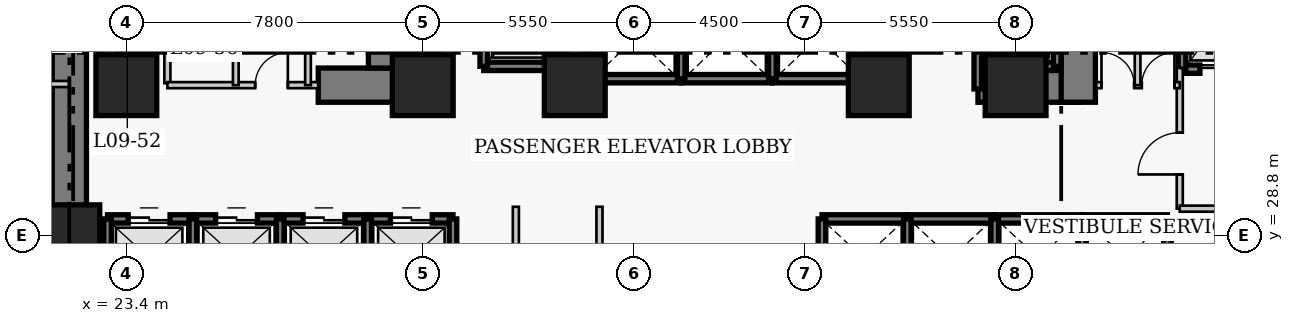
"""IFC4 building model, lengths in metres.
Left out: names, types, materials, properties, quantities, classifications, styles, units other than length and angle.
Written with IfcOpenShell. Run it as: python <this file> out.ifc"""

import sys

from ifc_helpers import new_model, si_unit, direction, frame, frame_2d, origin, origin_2d, place, context, subcontext, project, spatial, rectangle, extrude, element, fill, save


model = new_model("IFC4")
c1 = context("Model", 3, precision=1e-05, world=origin(), true_north=direction((0.0, 1.0)))
c2 = subcontext(c1, "Body", "Model", "MODEL_VIEW")
j1 = project(units=[si_unit("LENGTHUNIT", "METRE"), si_unit("PLANEANGLEUNIT", "RADIAN")], contexts=[c1])
p1 = place(None, origin())
s1 = spatial("IfcSite", under=j1, at=p1, CompositionType="ELEMENT")
p2 = place(p1, origin())
s2 = spatial("IfcBuilding", under=s1, at=p2, CompositionType="ELEMENT")
p3 = place(p2, frame((0.0, 0.0, 41.2)))
s3 = spatial("IfcBuildingStorey", under=s2, at=p3, CompositionType="ELEMENT", Elevation=41.2)
p4 = place(p3, frame((21.9, 27.05, 0.0), z_axis=(0.0, 0.0, 1.0), x_axis=(0.0, 1.0, 0.0)))
e1 = element("IfcWall", 1, at=p4, inside=s3, PredefinedType="SHEAR", context=c2, shape_type="SweptSolid", body=[
    extrude(rectangle(XDim=13.72, YDim=0.9, at=frame_2d((6.86, 0.0))), origin(), (0.0, 0.0, 1.0), 3.8),
])
p5 = place(p3, frame((28.45, 32.75, 0.0), z_axis=(0.0, 0.0, 1.0), x_axis=(1.0, 0.0, 0.0)))
e2 = element("IfcWall", 2, at=p5, inside=s3, PredefinedType="SHEAR", context=c2, shape_type="SweptSolid", body=[
    extrude(rectangle(XDim=2.4, YDim=0.9, at=frame_2d((1.2, 0.0))), origin(), (0.0, 0.0, 1.0), 3.8),
])
p6 = place(p3, frame((45.81, 32.75, 0.0), z_axis=(0.0, 0.0, 1.0), x_axis=(1.0, 0.0, 0.0)))
e3 = element("IfcWall", 3, at=p6, inside=s3, PredefinedType="SHEAR", context=c2, shape_type="SweptSolid", body=[
    extrude(rectangle(XDim=2.64, YDim=0.9, at=frame_2d((1.32, 0.0))), origin(), (0.0, 0.0, 1.0), 3.8),
])
p7 = place(p3, frame((30.22, 33.2, 0.0), z_axis=(0.0, 0.0, 1.0), x_axis=(0.0, 1.0, 0.0)))
e4 = element("IfcWall", 4, at=p7, inside=s3, PredefinedType="SHEAR", context=c2, shape_type="SweptSolid", body=[
    extrude(rectangle(XDim=7.12, YDim=0.9, at=frame_2d((3.56, 0.0))), origin(), (0.0, 0.0, 1.0), 3.8),
])
p8 = place(p3, frame((48.45, 32.3, 0.0), z_axis=(0.0, 0.0, 1.0), x_axis=(0.0, 1.0, 0.0)))
e5 = element("IfcWall", 5, at=p8, inside=s3, PredefinedType="SHEAR", context=c2, shape_type="SweptSolid", body=[
    extrude(rectangle(XDim=8.02, YDim=0.9, at=frame_2d((4.01, 0.0))), origin(), (0.0, 0.0, 1.0), 3.8),
])
p9 = place(p8, frame((5.9, 0.0, 0.0)))
e6 = element("IfcOpeningElement", 6, at=p9, cuts=e5, PredefinedType="OPENING", context=c2, shape_type="SweptSolid", body=[
    extrude(rectangle(XDim=1.1, YDim=2.15, at=frame_2d((0.55, 1.075))), frame((0.0, 0.46, 0.0), z_axis=(0.0, -1.0, 0.0), x_axis=(1.0, 0.0, 0.0)), (0.0, 0.0, 1.0), 0.92),
])
for number, where, z_axis, x_axis in (
    (7, (21.9, 28.8, 0.0), (0.0, 0.0, 1.0), (1.0, 0.0, 0.0)),
    (8, (23.4, 32.75, 0.0), (0.0, 0.0, 1.0), (1.0, 0.0, 0.0)),
    (9, (31.2, 32.75, 0.0), (0.0, 0.0, 1.0), (1.0, 0.0, 0.0)),
    (10, (35.2, 32.75, 0.0), (0.0, 0.0, 1.0), (1.0, 0.0, 0.0)),
    (11, (43.2, 32.75, 0.0), (0.0, 0.0, 1.0), (1.0, 0.0, 0.0)),
    (12, (46.8, 32.75, 0.0), (0.0, 0.0, 1.0), (1.0, 0.0, 0.0)),
):
    element("IfcColumn", number, at=place(p3, frame(where, z_axis=z_axis, x_axis=x_axis)), inside=s3, PredefinedType="COLUMN", context=c2, shape_type="SweptSolid", body=[
        extrude(rectangle(XDim=1.6, YDim=1.6, at=origin_2d()), origin(), (0.0, 0.0, 1.0), 3.8),
    ])
p10 = place(p3, frame((22.905, 29.23, 0.0), z_axis=(0.0, 0.0, 1.0), x_axis=(1.0, 0.0, 0.0)))
e13 = element("IfcWall", 13, at=p10, inside=s3, PredefinedType="SHEAR", context=c2, shape_type="SweptSolid", body=[
    extrude(rectangle(XDim=2.245, YDim=0.22, at=frame_2d((1.123, 0.0))), origin(), (0.0, 0.0, 1.0), 3.8),
])
p11 = place(p10, frame((0.545, 0.0, 0.0)))
e14 = element("IfcOpeningElement", 14, at=p11, cuts=e13, PredefinedType="OPENING", context=c2, shape_type="SweptSolid", body=[
    extrude(rectangle(XDim=1.1, YDim=2.15, at=frame_2d((0.55, 1.075))), frame((0.0, 0.12, 0.0), z_axis=(0.0, -1.0, 0.0), x_axis=(1.0, 0.0, 0.0)), (0.0, 0.0, 1.0), 0.24),
])
p12 = place(p3, frame((22.905, 27.17, 0.0), z_axis=(0.0, 0.0, 1.0), x_axis=(0.0, 1.0, 0.0)))
e15 = element("IfcWall", 15, at=p12, inside=s3, PredefinedType="SHEAR", context=c2, shape_type="SweptSolid", body=[
    extrude(rectangle(XDim=2.06, YDim=0.2, at=frame_2d((1.03, 0.0))), origin(), (0.0, 0.0, 1.0), 3.8),
])
p13 = place(p3, frame((25.15, 29.23, 0.0), z_axis=(0.0, 0.0, 1.0), x_axis=(1.0, 0.0, 0.0)))
e16 = element("IfcWall", 16, at=p13, inside=s3, PredefinedType="SHEAR", context=c2, shape_type="SweptSolid", body=[
    extrude(rectangle(XDim=2.3, YDim=0.22, at=frame_2d((1.15, 0.0))), origin(), (0.0, 0.0, 1.0), 3.8),
])
p14 = place(p13, frame((0.6, 0.0, 0.0)))
e17 = element("IfcOpeningElement", 17, at=p14, cuts=e16, PredefinedType="OPENING", context=c2, shape_type="SweptSolid", body=[
    extrude(rectangle(XDim=1.1, YDim=2.15, at=frame_2d((0.55, 1.075))), frame((0.0, 0.12, 0.0), z_axis=(0.0, -1.0, 0.0), x_axis=(1.0, 0.0, 0.0)), (0.0, 0.0, 1.0), 0.24),
])
p15 = place(p3, frame((25.15, 27.17, 0.0), z_axis=(0.0, 0.0, 1.0), x_axis=(0.0, 1.0, 0.0)))
e18 = element("IfcWall", 18, at=p15, inside=s3, PredefinedType="SHEAR", context=c2, shape_type="SweptSolid", body=[
    extrude(rectangle(XDim=2.06, YDim=0.2, at=frame_2d((1.03, 0.0))), origin(), (0.0, 0.0, 1.0), 3.8),
])
p16 = place(p3, frame((27.45, 29.23, 0.0), z_axis=(0.0, 0.0, 1.0), x_axis=(1.0, 0.0, 0.0)))
e19 = element("IfcWall", 19, at=p16, inside=s3, PredefinedType="SHEAR", context=c2, shape_type="SweptSolid", body=[
    extrude(rectangle(XDim=2.3, YDim=0.22, at=frame_2d((1.15, 0.0))), origin(), (0.0, 0.0, 1.0), 3.8),
])
p17 = place(p16, frame((0.6, 0.0, 0.0)))
e20 = element("IfcOpeningElement", 20, at=p17, cuts=e19, PredefinedType="OPENING", context=c2, shape_type="SweptSolid", body=[
    extrude(rectangle(XDim=1.1, YDim=2.15, at=frame_2d((0.55, 1.075))), frame((0.0, 0.12, 0.0), z_axis=(0.0, -1.0, 0.0), x_axis=(1.0, 0.0, 0.0)), (0.0, 0.0, 1.0), 0.24),
])
p18 = place(p3, frame((27.45, 27.17, 0.0), z_axis=(0.0, 0.0, 1.0), x_axis=(0.0, 1.0, 0.0)))
e21 = element("IfcWall", 21, at=p18, inside=s3, PredefinedType="SHEAR", context=c2, shape_type="SweptSolid", body=[
    extrude(rectangle(XDim=2.06, YDim=0.2, at=frame_2d((1.03, 0.0))), origin(), (0.0, 0.0, 1.0), 3.8),
])
p19 = place(p3, frame((29.75, 29.23, 0.0), z_axis=(0.0, 0.0, 1.0), x_axis=(1.0, 0.0, 0.0)))
e22 = element("IfcWall", 22, at=p19, inside=s3, PredefinedType="SHEAR", context=c2, shape_type="SweptSolid", body=[
    extrude(rectangle(XDim=2.245, YDim=0.22, at=frame_2d((1.123, 0.0))), origin(), (0.0, 0.0, 1.0), 3.8),
])
p20 = place(p19, frame((0.6, 0.0, 0.0)))
e23 = element("IfcOpeningElement", 23, at=p20, cuts=e22, PredefinedType="OPENING", context=c2, shape_type="SweptSolid", body=[
    extrude(rectangle(XDim=1.1, YDim=2.15, at=frame_2d((0.55, 1.075))), frame((0.0, 0.12, 0.0), z_axis=(0.0, -1.0, 0.0), x_axis=(1.0, 0.0, 0.0)), (0.0, 0.0, 1.0), 0.24),
])
for number, where, z_axis, x_axis in (
    (24, (29.75, 27.17, 0.0), (0.0, 0.0, 1.0), (0.0, 1.0, 0.0)),
    (25, (31.995, 27.17, 0.0), (0.0, 0.0, 1.0), (0.0, 1.0, 0.0)),
):
    element("IfcWall", number, at=place(p3, frame(where, z_axis=z_axis, x_axis=x_axis)), inside=s3, PredefinedType="SHEAR", context=c2, shape_type="SweptSolid", body=[
        extrude(rectangle(XDim=2.06, YDim=0.2, at=frame_2d((1.03, 0.0))), origin(), (0.0, 0.0, 1.0), 3.8),
    ])
p21 = place(p3, frame((41.705, 29.23, 0.0), z_axis=(0.0, 0.0, 1.0), x_axis=(1.0, 0.0, 0.0)))
e26 = element("IfcWall", 26, at=p21, inside=s3, PredefinedType="SHEAR", context=c2, shape_type="SweptSolid", body=[
    extrude(rectangle(XDim=2.245, YDim=0.22, at=frame_2d((1.123, 0.0))), origin(), (0.0, 0.0, 1.0), 3.8),
])
p22 = place(p3, frame((41.705, 27.17, 0.0), z_axis=(0.0, 0.0, 1.0), x_axis=(0.0, 1.0, 0.0)))
e27 = element("IfcWall", 27, at=p22, inside=s3, PredefinedType="SHEAR", context=c2, shape_type="SweptSolid", body=[
    extrude(rectangle(XDim=2.06, YDim=0.2, at=frame_2d((1.03, 0.0))), origin(), (0.0, 0.0, 1.0), 3.8),
])
p23 = place(p3, frame((43.95, 29.23, 0.0), z_axis=(0.0, 0.0, 1.0), x_axis=(1.0, 0.0, 0.0)))
e28 = element("IfcWall", 28, at=p23, inside=s3, PredefinedType="SHEAR", context=c2, shape_type="SweptSolid", body=[
    extrude(rectangle(XDim=2.3, YDim=0.22, at=frame_2d((1.15, 0.0))), origin(), (0.0, 0.0, 1.0), 3.8),
])
p24 = place(p3, frame((43.95, 27.17, 0.0), z_axis=(0.0, 0.0, 1.0), x_axis=(0.0, 1.0, 0.0)))
e29 = element("IfcWall", 29, at=p24, inside=s3, PredefinedType="SHEAR", context=c2, shape_type="SweptSolid", body=[
    extrude(rectangle(XDim=2.06, YDim=0.2, at=frame_2d((1.03, 0.0))), origin(), (0.0, 0.0, 1.0), 3.8),
])
p25 = place(p3, frame((46.25, 29.23, 0.0), z_axis=(0.0, 0.0, 1.0), x_axis=(1.0, 0.0, 0.0)))
e30 = element("IfcWall", 30, at=p25, inside=s3, PredefinedType="SHEAR", context=c2, shape_type="SweptSolid", body=[
    extrude(rectangle(XDim=2.3, YDim=0.22, at=frame_2d((1.15, 0.0))), origin(), (0.0, 0.0, 1.0), 3.8),
])
p26 = place(p3, frame((46.25, 27.17, 0.0), z_axis=(0.0, 0.0, 1.0), x_axis=(0.0, 1.0, 0.0)))
e31 = element("IfcWall", 31, at=p26, inside=s3, PredefinedType="SHEAR", context=c2, shape_type="SweptSolid", body=[
    extrude(rectangle(XDim=2.06, YDim=0.2, at=frame_2d((1.03, 0.0))), origin(), (0.0, 0.0, 1.0), 3.8),
])
p27 = place(p3, frame((48.55, 29.23, 0.0), z_axis=(0.0, 0.0, 1.0), x_axis=(1.0, 0.0, 0.0)))
e32 = element("IfcWall", 32, at=p27, inside=s3, PredefinedType="SHEAR", context=c2, shape_type="SweptSolid", body=[
    extrude(rectangle(XDim=2.245, YDim=0.22, at=frame_2d((1.123, 0.0))), origin(), (0.0, 0.0, 1.0), 3.8),
])
for number, where, z_axis, x_axis in (
    (33, (48.55, 27.17, 0.0), (0.0, 0.0, 1.0), (0.0, 1.0, 0.0)),
    (34, (50.795, 27.17, 0.0), (0.0, 0.0, 1.0), (0.0, 1.0, 0.0)),
):
    element("IfcWall", number, at=place(p3, frame(where, z_axis=z_axis, x_axis=x_axis)), inside=s3, PredefinedType="SHEAR", context=c2, shape_type="SweptSolid", body=[
        extrude(rectangle(XDim=2.06, YDim=0.2, at=frame_2d((1.03, 0.0))), origin(), (0.0, 0.0, 1.0), 3.8),
    ])
p28 = place(p3, frame((35.68, 32.92, 0.0), z_axis=(0.0, 0.0, 1.0), x_axis=(1.0, 0.0, 0.0)))
e35 = element("IfcWall", 35, at=p28, inside=s3, PredefinedType="SHEAR", context=c2, shape_type="SweptSolid", body=[
    extrude(rectangle(XDim=2.32, YDim=0.22, at=frame_2d((1.16, 0.0))), origin(), (0.0, 0.0, 1.0), 3.8),
])
p29 = place(p3, frame((35.68, 32.92, 0.0), z_axis=(0.0, 0.0, 1.0), x_axis=(0.0, 1.0, 0.0)))
e36 = element("IfcWall", 36, at=p29, inside=s3, PredefinedType="SHEAR", context=c2, shape_type="SweptSolid", body=[
    extrude(rectangle(XDim=2.16, YDim=0.2, at=frame_2d((1.08, 0.0))), origin(), (0.0, 0.0, 1.0), 3.8),
])
p30 = place(p3, frame((38.0, 32.92, 0.0), z_axis=(0.0, 0.0, 1.0), x_axis=(1.0, 0.0, 0.0)))
e37 = element("IfcWall", 37, at=p30, inside=s3, PredefinedType="SHEAR", context=c2, shape_type="SweptSolid", body=[
    extrude(rectangle(XDim=2.4, YDim=0.22, at=frame_2d((1.2, 0.0))), origin(), (0.0, 0.0, 1.0), 3.8),
])
p31 = place(p3, frame((38.0, 32.92, 0.0), z_axis=(0.0, 0.0, 1.0), x_axis=(0.0, 1.0, 0.0)))
e38 = element("IfcWall", 38, at=p31, inside=s3, PredefinedType="SHEAR", context=c2, shape_type="SweptSolid", body=[
    extrude(rectangle(XDim=2.16, YDim=0.2, at=frame_2d((1.08, 0.0))), origin(), (0.0, 0.0, 1.0), 3.8),
])
p32 = place(p3, frame((40.4, 32.92, 0.0), z_axis=(0.0, 0.0, 1.0), x_axis=(1.0, 0.0, 0.0)))
e39 = element("IfcWall", 39, at=p32, inside=s3, PredefinedType="SHEAR", context=c2, shape_type="SweptSolid", body=[
    extrude(rectangle(XDim=2.32, YDim=0.22, at=frame_2d((1.16, 0.0))), origin(), (0.0, 0.0, 1.0), 3.8),
])
for number, where, z_axis, x_axis in (
    (40, (40.4, 32.92, 0.0), (0.0, 0.0, 1.0), (0.0, 1.0, 0.0)),
    (41, (42.72, 32.92, 0.0), (0.0, 0.0, 1.0), (0.0, 1.0, 0.0)),
):
    element("IfcWall", number, at=place(p3, frame(where, z_axis=z_axis, x_axis=x_axis)), inside=s3, PredefinedType="SHEAR", context=c2, shape_type="SweptSolid", body=[
        extrude(rectangle(XDim=2.16, YDim=0.2, at=frame_2d((1.08, 0.0))), origin(), (0.0, 0.0, 1.0), 3.8),
    ])
p33 = place(p3, frame((51.18, 33.17, 0.0), z_axis=(0.0, 0.0, 1.0), x_axis=(1.0, 0.0, 0.0)))
e42 = element("IfcWall", 42, at=p33, inside=s3, PredefinedType="SHEAR", context=c2, shape_type="SweptSolid", body=[
    extrude(rectangle(XDim=2.42, YDim=0.22, at=frame_2d((1.21, 0.0))), origin(), (0.0, 0.0, 1.0), 3.8),
])
p34 = place(p33, frame((0.47, 0.0, 0.0)))
e43 = element("IfcOpeningElement", 43, at=p34, cuts=e42, PredefinedType="OPENING", context=c2, shape_type="SweptSolid", body=[
    extrude(rectangle(XDim=1.3, YDim=2.15, at=frame_2d((0.65, 1.075))), frame((0.0, 0.12, 0.0), z_axis=(0.0, -1.0, 0.0), x_axis=(1.0, 0.0, 0.0)), (0.0, 0.0, 1.0), 0.24),
])
p35 = place(p3, frame((51.18, 33.17, 0.0), z_axis=(0.0, 0.0, 1.0), x_axis=(0.0, 1.0, 0.0)))
e44 = element("IfcWall", 44, at=p35, inside=s3, PredefinedType="SHEAR", context=c2, shape_type="SweptSolid", body=[
    extrude(rectangle(XDim=2.86, YDim=0.2, at=frame_2d((1.43, 0.0))), origin(), (0.0, 0.0, 1.0), 3.8),
])
p36 = place(p3, frame((32.805, 33.245, 0.0), z_axis=(0.0, 0.0, 1.0), x_axis=(1.0, 0.0, 0.0)))
e45 = element("IfcWall", 45, at=p36, inside=s3, PredefinedType="SHEAR", context=c2, shape_type="SweptSolid", body=[
    extrude(rectangle(XDim=2.09, YDim=0.22, at=frame_2d((1.045, 0.0))), origin(), (0.0, 0.0, 1.0), 3.8),
])
for number, where, z_axis, x_axis in (
    (46, (32.805, 33.245, 0.0), (0.0, 0.0, 1.0), (0.0, 1.0, 0.0)),
    (47, (34.895, 33.245, 0.0), (0.0, 0.0, 1.0), (0.0, 1.0, 0.0)),
):
    element("IfcWall", number, at=place(p3, frame(where, z_axis=z_axis, x_axis=x_axis)), inside=s3, PredefinedType="SHEAR", context=c2, shape_type="SweptSolid", body=[
        extrude(rectangle(XDim=2.91, YDim=0.2, at=frame_2d((1.455, 0.0))), origin(), (0.0, 0.0, 1.0), 3.8),
    ])
p37 = place(p3, frame((45.805, 33.245, 0.0), z_axis=(0.0, 0.0, 1.0), x_axis=(1.0, 0.0, 0.0)))
e48 = element("IfcWall", 48, at=p37, inside=s3, PredefinedType="SHEAR", context=c2, shape_type="SweptSolid", body=[
    extrude(rectangle(XDim=2.09, YDim=0.22, at=frame_2d((1.045, 0.0))), origin(), (0.0, 0.0, 1.0), 3.8),
])
p38 = place(p3, frame((45.805, 32.65, 0.0), z_axis=(0.0, 0.0, 1.0), x_axis=(0.0, 1.0, 0.0)))
e49 = element("IfcWall", 49, at=p38, inside=s3, PredefinedType="SHEAR", context=c2, shape_type="SweptSolid", body=[
    extrude(rectangle(XDim=3.505, YDim=0.2, at=frame_2d((1.752, 0.0))), origin(), (0.0, 0.0, 1.0), 3.8),
])
p39 = place(p3, frame((47.895, 33.245, 0.0), z_axis=(0.0, 0.0, 1.0), x_axis=(0.0, 1.0, 0.0)))
e50 = element("IfcWall", 50, at=p39, inside=s3, PredefinedType="SHEAR", context=c2, shape_type="SweptSolid", body=[
    extrude(rectangle(XDim=2.91, YDim=0.2, at=frame_2d((1.455, 0.0))), origin(), (0.0, 0.0, 1.0), 3.8),
])
p40 = place(p3, frame((24.48, 32.8, 0.0), z_axis=(0.0, 0.0, 1.0), x_axis=(0.0, 1.0, 0.0)))
e51 = element("IfcWall", 51, at=p40, inside=s3, PredefinedType="PARTITIONING", context=c2, shape_type="SweptSolid", body=[
    extrude(rectangle(XDim=3.57, YDim=0.16, at=frame_2d((1.785, 0.0))), origin(), (0.0, 0.0, 1.0), 3.54),
])
p41 = place(p40, frame((1.604, 0.0, 0.0)))
e52 = element("IfcOpeningElement", 52, at=p41, cuts=e51, PredefinedType="OPENING", context=c2, shape_type="SweptSolid", body=[
    extrude(rectangle(XDim=0.9, YDim=2.1, at=frame_2d((0.45, 1.05))), frame((0.0, 0.09, 0.0), z_axis=(0.0, -1.0, 0.0), x_axis=(1.0, 0.0, 0.0)), (0.0, 0.0, 1.0), 0.18),
])
p42 = place(p3, frame((51.12, 29.5, 0.0), z_axis=(0.0, 0.0, 1.0), x_axis=(0.0, 1.0, 0.0)))
e53 = element("IfcWall", 53, at=p42, inside=s3, PredefinedType="PARTITIONING", context=c2, shape_type="SweptSolid", body=[
    extrude(rectangle(XDim=3.7, YDim=0.16, at=frame_2d((1.85, 0.0))), origin(), (0.0, 0.0, 1.0), 3.54),
])
p43 = place(p42, frame((0.9, 0.0, 0.0)))
e54 = element("IfcOpeningElement", 54, at=p43, cuts=e53, PredefinedType="OPENING", context=c2, shape_type="SweptSolid", body=[
    extrude(rectangle(XDim=1.1, YDim=2.15, at=frame_2d((0.55, 1.075))), frame((0.0, 0.09, 0.0), z_axis=(0.0, -1.0, 0.0), x_axis=(1.0, 0.0, 0.0)), (0.0, 0.0, 1.0), 0.18),
])
p44 = place(p3, frame((51.12, 29.5, 0.0), z_axis=(0.0, 0.0, 1.0), x_axis=(1.0, 0.0, 0.0)))
e55 = element("IfcWall", 55, at=p44, inside=s3, PredefinedType="PARTITIONING", context=c2, shape_type="SweptSolid", body=[
    extrude(rectangle(XDim=5.63, YDim=0.16, at=frame_2d((2.815, 0.0))), origin(), (0.0, 0.0, 1.0), 3.54),
])
p45 = place(p3, frame((24.48, 32.75, 0.0), z_axis=(0.0, 0.0, 1.0), x_axis=(1.0, 0.0, 0.0)))
e56 = element("IfcWall", 56, at=p45, inside=s3, PredefinedType="PARTITIONING", context=c2, shape_type="SweptSolid", body=[
    extrude(rectangle(XDim=3.97, YDim=0.16, at=frame_2d((1.985, 0.0))), origin(), (0.0, 0.0, 1.0), 3.54),
])
p46 = place(p45, frame((2.31, 0.0, 0.0)))
e57 = element("IfcOpeningElement", 57, at=p46, cuts=e56, PredefinedType="OPENING", context=c2, shape_type="SweptSolid", body=[
    extrude(rectangle(XDim=0.86, YDim=2.05, at=frame_2d((0.43, 1.025))), frame((0.0, 0.09, 0.0), z_axis=(0.0, -1.0, 0.0), x_axis=(1.0, 0.0, 0.0)), (0.0, 0.0, 1.0), 0.18),
])
p47 = place(p3, frame((48.92, 32.75, 0.0), z_axis=(0.0, 0.0, 1.0), x_axis=(1.0, 0.0, 0.0)))
e58 = element("IfcWall", 58, at=p47, inside=s3, PredefinedType="PARTITIONING", context=c2, shape_type="SweptSolid", body=[
    extrude(rectangle(XDim=2.2, YDim=0.16, at=frame_2d((1.1, 0.0))), origin(), (0.0, 0.0, 1.0), 3.54),
])
p48 = place(p47, frame((0.14, 0.0, 0.0)))
e59 = element("IfcOpeningElement", 59, at=p48, cuts=e58, PredefinedType="OPENING", context=c2, shape_type="SweptSolid", body=[
    extrude(rectangle(XDim=0.86, YDim=2.05, at=frame_2d((0.43, 1.025))), frame((0.0, 0.09, 0.0), z_axis=(0.0, -1.0, 0.0), x_axis=(1.0, 0.0, 0.0)), (0.0, 0.0, 1.0), 0.18),
])
p49 = place(p47, frame((1.2, 0.0, 0.0)))
e60 = element("IfcOpeningElement", 60, at=p49, cuts=e58, PredefinedType="OPENING", context=c2, shape_type="SweptSolid", body=[
    extrude(rectangle(XDim=0.86, YDim=2.05, at=frame_2d((0.43, 1.025))), frame((0.0, 0.09, 0.0), z_axis=(0.0, -1.0, 0.0), x_axis=(1.0, 0.0, 0.0)), (0.0, 0.0, 1.0), 0.18),
])
for number, where, z_axis, x_axis in (
    (61, (26.28, 32.75, 0.0), (0.0, 0.0, 1.0), (0.0, 1.0, 0.0)),
    (62, (28.18, 32.75, 0.0), (0.0, 0.0, 1.0), (0.0, 1.0, 0.0)),
    (63, (50.01, 32.75, 0.0), (0.0, 0.0, 1.0), (0.0, 1.0, 0.0)),
):
    element("IfcWall", number, at=place(p3, frame(where, z_axis=z_axis, x_axis=x_axis)), inside=s3, PredefinedType="PARTITIONING", context=c2, shape_type="SweptSolid", body=[
        extrude(rectangle(XDim=3.62, YDim=0.15, at=frame_2d((1.81, 0.0))), origin(), (0.0, 0.0, 1.0), 3.54),
    ])
for number, where, z_axis, x_axis in (
    (64, (33.65, 24.71, 0.0), (0.0, 0.0, 1.0), (0.0, 1.0, 0.0)),
    (65, (35.85, 24.71, 0.0), (0.0, 0.0, 1.0), (0.0, 1.0, 0.0)),
):
    element("IfcWall", number, at=place(p3, frame(where, z_axis=z_axis, x_axis=x_axis)), inside=s3, PredefinedType="PARTITIONING", context=c2, shape_type="SweptSolid", body=[
        extrude(rectangle(XDim=4.84, YDim=0.16, at=frame_2d((2.42, 0.0))), origin(), (0.0, 0.0, 1.0), 3.54),
    ])
p50 = place(p3, frame((18.86, 32.78, 0.0), z_axis=(0.0, 0.0, 1.0), x_axis=(1.0, 0.0, 0.0)))
e66 = element("IfcWall", 66, at=p50, inside=s3, PredefinedType="PARTITIONING", context=c2, shape_type="SweptSolid", body=[
    extrude(rectangle(XDim=3.04, YDim=0.16, at=frame_2d((1.52, 0.0))), origin(), (0.0, 0.0, 1.0), 3.54),
])
p51 = place(p11, origin())
e67 = element("IfcDoor", 67, at=p51, inside=s3, OperationType="DOUBLE_DOOR_SLIDING", PredefinedType="DOOR", context=c2, shape_type="SweptSolid", body=[
    extrude(rectangle(XDim=1.1, YDim=2.15, at=frame_2d((0.55, 1.075))), frame((0.0, 0.025, 0.0), z_axis=(0.0, -1.0, 0.0), x_axis=(1.0, 0.0, 0.0)), (0.0, 0.0, 1.0), 0.05),
])
fill(e14, e67)
p52 = place(p14, origin())
e68 = element("IfcDoor", 68, at=p52, inside=s3, OperationType="DOUBLE_DOOR_SLIDING", PredefinedType="DOOR", context=c2, shape_type="SweptSolid", body=[
    extrude(rectangle(XDim=1.1, YDim=2.15, at=frame_2d((0.55, 1.075))), frame((0.0, 0.025, 0.0), z_axis=(0.0, -1.0, 0.0), x_axis=(1.0, 0.0, 0.0)), (0.0, 0.0, 1.0), 0.05),
])
fill(e17, e68)
p53 = place(p17, origin())
e69 = element("IfcDoor", 69, at=p53, inside=s3, OperationType="DOUBLE_DOOR_SLIDING", PredefinedType="DOOR", context=c2, shape_type="SweptSolid", body=[
    extrude(rectangle(XDim=1.1, YDim=2.15, at=frame_2d((0.55, 1.075))), frame((0.0, 0.025, 0.0), z_axis=(0.0, -1.0, 0.0), x_axis=(1.0, 0.0, 0.0)), (0.0, 0.0, 1.0), 0.05),
])
fill(e20, e69)
p54 = place(p20, origin())
e70 = element("IfcDoor", 70, at=p54, inside=s3, OperationType="DOUBLE_DOOR_SLIDING", PredefinedType="DOOR", context=c2, shape_type="SweptSolid", body=[
    extrude(rectangle(XDim=1.1, YDim=2.15, at=frame_2d((0.55, 1.075))), frame((0.0, 0.025, 0.0), z_axis=(0.0, -1.0, 0.0), x_axis=(1.0, 0.0, 0.0)), (0.0, 0.0, 1.0), 0.05),
])
fill(e23, e70)
p55 = place(p34, origin())
e71 = element("IfcDoor", 71, at=p55, inside=s3, OperationType="DOUBLE_DOOR_SLIDING", PredefinedType="DOOR", context=c2, shape_type="SweptSolid", body=[
    extrude(rectangle(XDim=1.3, YDim=2.15, at=frame_2d((0.65, 1.075))), frame((0.0, 0.025, 0.0), z_axis=(0.0, -1.0, 0.0), x_axis=(1.0, 0.0, 0.0)), (0.0, 0.0, 1.0), 0.05),
])
fill(e43, e71)
p56 = place(p43, origin())
e72 = element("IfcDoor", 72, at=p56, inside=s3, OperationType="SINGLE_SWING_LEFT", PredefinedType="DOOR", context=c2, shape_type="SweptSolid", body=[
    extrude(rectangle(XDim=1.1, YDim=2.15, at=frame_2d((0.55, 1.075))), frame((0.0, 0.025, 0.0), z_axis=(0.0, -1.0, 0.0), x_axis=(1.0, 0.0, 0.0)), (0.0, 0.0, 1.0), 0.05),
])
fill(e54, e72)
p57 = place(p46, origin())
e73 = element("IfcDoor", 73, at=p57, inside=s3, OperationType="SINGLE_SWING_RIGHT", PredefinedType="DOOR", context=c2, shape_type="SweptSolid", body=[
    extrude(rectangle(XDim=0.86, YDim=2.05, at=frame_2d((0.43, 1.025))), frame((0.0, 0.025, 0.0), z_axis=(0.0, -1.0, 0.0), x_axis=(1.0, 0.0, 0.0)), (0.0, 0.0, 1.0), 0.05),
])
fill(e57, e73)
p58 = place(p48, origin())
e74 = element("IfcDoor", 74, at=p58, inside=s3, OperationType="SINGLE_SWING_LEFT", PredefinedType="DOOR", context=c2, shape_type="SweptSolid", body=[
    extrude(rectangle(XDim=0.86, YDim=2.05, at=frame_2d((0.43, 1.025))), frame((0.0, 0.025, 0.0), z_axis=(0.0, -1.0, 0.0), x_axis=(1.0, 0.0, 0.0)), (0.0, 0.0, 1.0), 0.05),
])
fill(e59, e74)
p59 = place(p49, origin())
e75 = element("IfcDoor", 75, at=p59, inside=s3, OperationType="SINGLE_SWING_RIGHT", PredefinedType="DOOR", context=c2, shape_type="SweptSolid", body=[
    extrude(rectangle(XDim=0.86, YDim=2.05, at=frame_2d((0.43, 1.025))), frame((0.0, 0.025, 0.0), z_axis=(0.0, -1.0, 0.0), x_axis=(1.0, 0.0, 0.0)), (0.0, 0.0, 1.0), 0.05),
])
fill(e60, e75)
save(model, sys.argv[1])
